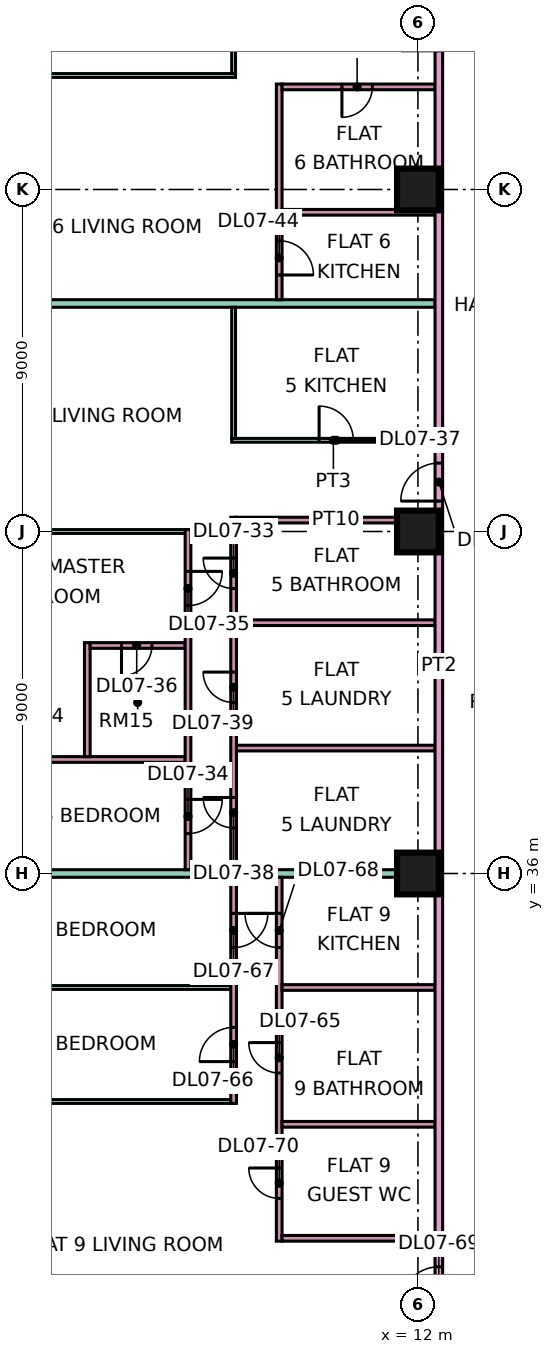
"""IFC4 building model, lengths in metres.
Left out: names, types, materials, properties, quantities, classifications, styles, units other than length and angle.
Written with IfcOpenShell. Run it as: python <this file> out.ifc"""

import sys

from ifc_helpers import new_model, si_unit, direction, frame, frame_2d, origin, origin_2d, place, context, subcontext, project, spatial, rectangle, extrude, element, fill, save


model = new_model("IFC4")
c1 = context("Model", 3, precision=1e-05, world=origin(), true_north=direction((0.0, 1.0)))
c2 = subcontext(c1, "Body", "Model", "MODEL_VIEW")
j1 = project(units=[si_unit("LENGTHUNIT", "METRE"), si_unit("PLANEANGLEUNIT", "RADIAN")], contexts=[c1])
p1 = place(None, origin())
s1 = spatial("IfcSite", under=j1, at=p1, CompositionType="ELEMENT")
p2 = place(p1, origin())
s2 = spatial("IfcBuilding", under=s1, at=p2, CompositionType="ELEMENT")
p3 = place(p2, frame((0.0, 0.0, 41.4)))
s3 = spatial("IfcBuildingStorey", under=s2, at=p3, CompositionType="ELEMENT", Elevation=41.4)
for number, where, z_axis, x_axis in (
    (1, (12.0, 36.0, 0.0), (0.0, 0.0, 1.0), (1.0, 0.0, 0.0)),
    (2, (12.0, 45.0, 0.0), (0.0, 0.0, 1.0), (1.0, 0.0, 0.0)),
    (3, (12.0, 54.0, 0.0), (0.0, 0.0, 1.0), (1.0, 0.0, 0.0)),
):
    element("IfcColumn", number, at=place(p3, frame(where, z_axis=z_axis, x_axis=x_axis)), inside=s3, PredefinedType="COLUMN", context=c2, shape_type="SweptSolid", body=[
        extrude(rectangle(XDim=1.1, YDim=1.1, at=origin_2d()), origin(), (0.0, 0.0, 1.0), 3.75),
    ])
p4 = place(p3, frame((-1.351, 33.0, 0.0), z_axis=(0.0, 0.0, 1.0), x_axis=(1.0, 0.0, 0.0)))
e4 = element("IfcWall", 4, at=p4, inside=s3, PredefinedType="PARTITIONING", context=c2, shape_type="SweptSolid", body=[
    extrude(rectangle(XDim=8.426, YDim=0.1, at=frame_2d((4.213, 0.0))), origin(), (0.0, 0.0, 1.0), 3.35),
])
p5 = place(p3, frame((-1.35, 30.0, 0.0), z_axis=(0.0, 0.0, 1.0), x_axis=(1.0, 0.0, 0.0)))
e5 = element("IfcWall", 5, at=p5, inside=s3, PredefinedType="PARTITIONING", context=c2, shape_type="SweptSolid", body=[
    extrude(rectangle(XDim=8.425, YDim=0.1, at=frame_2d((4.212, 0.0))), origin(), (0.0, 0.0, 1.0), 3.35),
])
p6 = place(p3, frame((0.0, 36.0, 0.0), z_axis=(0.0, 0.0, 1.0), x_axis=(1.0, 0.0, 0.0)))
e6 = element("IfcWall", 6, at=p6, inside=s3, PredefinedType="PARTITIONING", context=c2, shape_type="SweptSolid", body=[
    extrude(rectangle(XDim=12.45, YDim=0.2, at=frame_2d((6.225, 0.0))), origin(), (0.0, 0.0, 1.0), 3.35),
])
p7 = place(p3, frame((-1.35, 51.0, 0.0), z_axis=(0.0, 0.0, 1.0), x_axis=(1.0, 0.0, 0.0)))
e7 = element("IfcWall", 7, at=p7, inside=s3, PredefinedType="PARTITIONING", context=c2, shape_type="SweptSolid", body=[
    extrude(rectangle(XDim=13.8, YDim=0.2, at=frame_2d((6.9, 0.0))), origin(), (0.0, 0.0, 1.0), 3.35),
])
p8 = place(p3, frame((-1.35, 57.0, 0.0), z_axis=(0.0, 0.0, 1.0), x_axis=(1.0, 0.0, 0.0)))
e8 = element("IfcWall", 8, at=p8, inside=s3, PredefinedType="PARTITIONING", context=c2, shape_type="SweptSolid", body=[
    extrude(rectangle(XDim=8.55, YDim=0.1, at=frame_2d((4.275, 0.0))), origin(), (0.0, 0.0, 1.0), 3.35),
])
p9 = place(p3, frame((0.074, 39.0, 0.0), z_axis=(0.0, 0.0, 1.0), x_axis=(1.0, 0.0, 0.0)))
e9 = element("IfcWall", 9, at=p9, inside=s3, PredefinedType="PARTITIONING", context=c2, shape_type="SweptSolid", body=[
    extrude(rectangle(XDim=5.801, YDim=0.15, at=frame_2d((2.9, 0.0))), origin(), (0.0, 0.0, 1.0), 3.35),
])
p10 = place(p3, frame((0.074, 45.0, 0.0), z_axis=(0.0, 0.0, 1.0), x_axis=(1.0, 0.0, 0.0)))
e10 = element("IfcWall", 10, at=p10, inside=s3, PredefinedType="PARTITIONING", context=c2, shape_type="SweptSolid", body=[
    extrude(rectangle(XDim=5.801, YDim=0.1, at=frame_2d((2.9, 0.0))), origin(), (0.0, 0.0, 1.0), 3.35),
])
p11 = place(p3, frame((3.3, 39.075, 0.0), z_axis=(0.0, 0.0, 1.0), x_axis=(0.0, 1.0, 0.0)))
e11 = element("IfcWall", 11, at=p11, inside=s3, PredefinedType="PARTITIONING", context=c2, shape_type="SweptSolid", body=[
    extrude(rectangle(XDim=3.0, YDim=0.15, at=frame_2d((1.5, 0.0))), origin(), (0.0, 0.0, 1.0), 3.35),
])
p12 = place(p3, frame((3.375, 42.0, 0.0), z_axis=(0.0, 0.0, 1.0), x_axis=(1.0, 0.0, 0.0)))
e12 = element("IfcWall", 12, at=p12, inside=s3, PredefinedType="PARTITIONING", context=c2, shape_type="SweptSolid", body=[
    extrude(rectangle(XDim=2.5, YDim=0.15, at=frame_2d((1.25, 0.0))), origin(), (0.0, 0.0, 1.0), 3.35),
])
p13 = place(p12, frame((0.825, 0.0, 0.0)))
e13 = element("IfcOpeningElement", 13, at=p13, cuts=e12, PredefinedType="OPENING", context=c2, shape_type="SweptSolid", body=[
    extrude(rectangle(XDim=0.8, YDim=2.1, at=frame_2d((0.4, 1.05))), frame((0.0, 0.085, 0.0), z_axis=(0.0, -1.0, 0.0), x_axis=(1.0, 0.0, 0.0)), (0.0, 0.0, 1.0), 0.17),
])
p14 = place(p3, frame((5.95, 36.1, 0.0), z_axis=(0.0, 0.0, 1.0), x_axis=(0.0, 1.0, 0.0)))
e14 = element("IfcWall", 14, at=p14, inside=s3, PredefinedType="PARTITIONING", context=c2, shape_type="SweptSolid", body=[
    extrude(rectangle(XDim=8.95, YDim=0.15, at=frame_2d((4.475, 0.0))), origin(), (0.0, 0.0, 1.0), 3.35),
])
p15 = place(p14, frame((0.95, 0.0, 0.0)))
e15 = element("IfcOpeningElement", 15, at=p15, cuts=e14, PredefinedType="OPENING", context=c2, shape_type="SweptSolid", body=[
    extrude(rectangle(XDim=0.9, YDim=2.1, at=frame_2d((0.45, 1.05))), frame((0.0, 0.085, 0.0), z_axis=(0.0, -1.0, 0.0), x_axis=(1.0, 0.0, 0.0)), (0.0, 0.0, 1.0), 0.17),
])
p16 = place(p14, frame((6.95, 0.0, 0.0)))
e16 = element("IfcOpeningElement", 16, at=p16, cuts=e14, PredefinedType="OPENING", context=c2, shape_type="SweptSolid", body=[
    extrude(rectangle(XDim=0.9, YDim=2.1, at=frame_2d((0.45, 1.05))), frame((0.0, 0.085, 0.0), z_axis=(0.0, -1.0, 0.0), x_axis=(1.0, 0.0, 0.0)), (0.0, 0.0, 1.0), 0.17),
])
p17 = place(p3, frame((7.1, 47.4, 0.0), z_axis=(0.0, 0.0, 1.0), x_axis=(1.0, 0.0, 0.0)))
e17 = element("IfcWall", 17, at=p17, inside=s3, PredefinedType="PARTITIONING", context=c2, shape_type="SweptSolid", body=[
    extrude(rectangle(XDim=5.35, YDim=0.1, at=frame_2d((2.675, 0.0))), origin(), (0.0, 0.0, 1.0), 3.35),
])
p18 = place(p17, frame((2.3, 0.0, 0.0)))
e18 = element("IfcOpeningElement", 18, at=p18, cuts=e17, PredefinedType="OPENING", context=c2, shape_type="SweptSolid", body=[
    extrude(rectangle(XDim=0.9, YDim=2.1, at=frame_2d((0.45, 1.05))), frame((0.0, 0.06, 0.0), z_axis=(0.0, -1.0, 0.0), x_axis=(1.0, 0.0, 0.0)), (0.0, 0.0, 1.0), 0.12),
])
p19 = place(p3, frame((7.15, 29.95, 0.0), z_axis=(0.0, 0.0, 1.0), x_axis=(0.0, 1.0, 0.0)))
e19 = element("IfcWall", 19, at=p19, inside=s3, PredefinedType="PARTITIONING", context=c2, shape_type="SweptSolid", body=[
    extrude(rectangle(XDim=5.95, YDim=0.15, at=frame_2d((2.975, 0.0))), origin(), (0.0, 0.0, 1.0), 3.35),
])
p20 = place(p19, frame((1.1, 0.0, 0.0)))
e20 = element("IfcOpeningElement", 20, at=p20, cuts=e19, PredefinedType="OPENING", context=c2, shape_type="SweptSolid", body=[
    extrude(rectangle(XDim=0.9, YDim=2.1, at=frame_2d((0.45, 1.05))), frame((0.0, 0.085, 0.0), z_axis=(0.0, -1.0, 0.0), x_axis=(1.0, 0.0, 0.0)), (0.0, 0.0, 1.0), 0.17),
])
p21 = place(p19, frame((4.1, 0.0, 0.0)))
e21 = element("IfcOpeningElement", 21, at=p21, cuts=e19, PredefinedType="OPENING", context=c2, shape_type="SweptSolid", body=[
    extrude(rectangle(XDim=0.9, YDim=2.1, at=frame_2d((0.45, 1.05))), frame((0.0, 0.085, 0.0), z_axis=(0.0, -1.0, 0.0), x_axis=(1.0, 0.0, 0.0)), (0.0, 0.0, 1.0), 0.17),
])
p22 = place(p3, frame((7.15, 36.1, 0.0), z_axis=(0.0, 0.0, 1.0), x_axis=(0.0, 1.0, 0.0)))
e22 = element("IfcWall", 22, at=p22, inside=s3, PredefinedType="PARTITIONING", context=c2, shape_type="SweptSolid", body=[
    extrude(rectangle(XDim=9.275, YDim=0.15, at=frame_2d((4.637, 0.0))), origin(), (0.0, 0.0, 1.0), 3.35),
])
p23 = place(p22, frame((7.4, 0.0, 0.0)))
e23 = element("IfcOpeningElement", 23, at=p23, cuts=e22, PredefinedType="OPENING", context=c2, shape_type="SweptSolid", body=[
    extrude(rectangle(XDim=0.8, YDim=2.1, at=frame_2d((0.4, 1.05))), frame((0.0, 0.085, 0.0), z_axis=(0.0, -1.0, 0.0), x_axis=(1.0, 0.0, 0.0)), (0.0, 0.0, 1.0), 0.17),
])
p24 = place(p22, frame((1.1, 0.0, 0.0)))
e24 = element("IfcOpeningElement", 24, at=p24, cuts=e22, PredefinedType="OPENING", context=c2, shape_type="SweptSolid", body=[
    extrude(rectangle(XDim=0.8, YDim=2.1, at=frame_2d((0.4, 1.05))), frame((0.0, 0.085, 0.0), z_axis=(0.0, -1.0, 0.0), x_axis=(1.0, 0.0, 0.0)), (0.0, 0.0, 1.0), 0.17),
])
p25 = place(p22, frame((4.4, 0.0, 0.0)))
e25 = element("IfcOpeningElement", 25, at=p25, cuts=e22, PredefinedType="OPENING", context=c2, shape_type="SweptSolid", body=[
    extrude(rectangle(XDim=0.8, YDim=2.1, at=frame_2d((0.4, 1.05))), frame((0.0, 0.085, 0.0), z_axis=(0.0, -1.0, 0.0), x_axis=(1.0, 0.0, 0.0)), (0.0, 0.0, 1.0), 0.17),
])
p26 = place(p3, frame((7.15, 47.45, 0.0), z_axis=(0.0, 0.0, 1.0), x_axis=(0.0, 1.0, 0.0)))
e26 = element("IfcWall", 26, at=p26, inside=s3, PredefinedType="PARTITIONING", context=c2, shape_type="SweptSolid", body=[
    extrude(rectangle(XDim=3.45, YDim=0.1, at=frame_2d((1.725, 0.0))), origin(), (0.0, 0.0, 1.0), 3.35),
])
p27 = place(p3, frame((7.15, 57.05, 0.0), z_axis=(0.0, 0.0, 1.0), x_axis=(0.0, 1.0, 0.0)))
e27 = element("IfcWall", 27, at=p27, inside=s3, PredefinedType="PARTITIONING", context=c2, shape_type="SweptSolid", body=[
    extrude(rectangle(XDim=7.3, YDim=0.1, at=frame_2d((3.65, 0.0))), origin(), (0.0, 0.0, 1.0), 3.35),
])
p28 = place(p27, frame((1.0, 0.0, 0.0)))
e28 = element("IfcOpeningElement", 28, at=p28, cuts=e27, PredefinedType="OPENING", context=c2, shape_type="SweptSolid", body=[
    extrude(rectangle(XDim=0.9, YDim=2.1, at=frame_2d((0.45, 1.05))), frame((0.0, 0.06, 0.0), z_axis=(0.0, -1.0, 0.0), x_axis=(1.0, 0.0, 0.0)), (0.0, 0.0, 1.0), 0.12),
])
p29 = place(p27, frame((4.0, 0.0, 0.0)))
e29 = element("IfcOpeningElement", 29, at=p29, cuts=e27, PredefinedType="OPENING", context=c2, shape_type="SweptSolid", body=[
    extrude(rectangle(XDim=0.9, YDim=2.1, at=frame_2d((0.45, 1.05))), frame((0.0, 0.06, 0.0), z_axis=(0.0, -1.0, 0.0), x_axis=(1.0, 0.0, 0.0)), (0.0, 0.0, 1.0), 0.12),
])
for number, where, z_axis, x_axis in (
    (30, (7.225, 39.3, 0.0), (0.0, 0.0, 1.0), (1.0, 0.0, 0.0)),
    (31, (7.225, 42.6, 0.0), (0.0, 0.0, 1.0), (1.0, 0.0, 0.0)),
    (32, (7.225, 45.3, 0.0), (0.0, 0.0, 1.0), (1.0, 0.0, 0.0)),
):
    element("IfcWall", number, at=place(p3, frame(where, z_axis=z_axis, x_axis=x_axis)), inside=s3, PredefinedType="PARTITIONING", context=c2, shape_type="SweptSolid", body=[
        extrude(rectangle(XDim=5.225, YDim=0.15, at=frame_2d((2.612, 0.0))), origin(), (0.0, 0.0, 1.0), 3.35),
    ])
p30 = place(p3, frame((8.35, 26.325, 0.0), z_axis=(0.0, 0.0, 1.0), x_axis=(0.0, 1.0, 0.0)))
e33 = element("IfcWall", 33, at=p30, inside=s3, PredefinedType="PARTITIONING", context=c2, shape_type="SweptSolid", body=[
    extrude(rectangle(XDim=9.575, YDim=0.15, at=frame_2d((4.788, 0.0))), origin(), (0.0, 0.0, 1.0), 3.35),
])
p31 = place(p30, frame((4.425, 0.0, 0.0)))
e34 = element("IfcOpeningElement", 34, at=p31, cuts=e33, PredefinedType="OPENING", context=c2, shape_type="SweptSolid", body=[
    extrude(rectangle(XDim=0.8, YDim=2.1, at=frame_2d((0.4, 1.05))), frame((0.0, 0.085, 0.0), z_axis=(0.0, -1.0, 0.0), x_axis=(1.0, 0.0, 0.0)), (0.0, 0.0, 1.0), 0.17),
])
p32 = place(p30, frame((7.725, 0.0, 0.0)))
e35 = element("IfcOpeningElement", 35, at=p32, cuts=e33, PredefinedType="OPENING", context=c2, shape_type="SweptSolid", body=[
    extrude(rectangle(XDim=0.9, YDim=2.1, at=frame_2d((0.45, 1.05))), frame((0.0, 0.085, 0.0), z_axis=(0.0, -1.0, 0.0), x_axis=(1.0, 0.0, 0.0)), (0.0, 0.0, 1.0), 0.17),
])
p33 = place(p30, frame((1.125, 0.0, 0.0)))
e36 = element("IfcOpeningElement", 36, at=p33, cuts=e33, PredefinedType="OPENING", context=c2, shape_type="SweptSolid", body=[
    extrude(rectangle(XDim=0.8, YDim=2.1, at=frame_2d((0.4, 1.05))), frame((0.0, 0.085, 0.0), z_axis=(0.0, -1.0, 0.0), x_axis=(1.0, 0.0, 0.0)), (0.0, 0.0, 1.0), 0.17),
])
p34 = place(p3, frame((8.35, 51.1, 0.0), z_axis=(0.0, 0.0, 1.0), x_axis=(0.0, 1.0, 0.0)))
e37 = element("IfcWall", 37, at=p34, inside=s3, PredefinedType="PARTITIONING", context=c2, shape_type="SweptSolid", body=[
    extrude(rectangle(XDim=5.675, YDim=0.15, at=frame_2d((2.837, 0.0))), origin(), (0.0, 0.0, 1.0), 3.35),
])
p35 = place(p34, frame((0.65, 0.0, 0.0)))
e38 = element("IfcOpeningElement", 38, at=p35, cuts=e37, PredefinedType="OPENING", context=c2, shape_type="SweptSolid", body=[
    extrude(rectangle(XDim=0.9, YDim=2.1, at=frame_2d((0.45, 1.05))), frame((0.0, 0.085, 0.0), z_axis=(0.0, -1.0, 0.0), x_axis=(1.0, 0.0, 0.0)), (0.0, 0.0, 1.0), 0.17),
])
for number, where, z_axis, x_axis in (
    (39, (8.425, 26.4, 0.0), (0.0, 0.0, 1.0), (1.0, 0.0, 0.0)),
    (40, (8.425, 29.4, 0.0), (0.0, 0.0, 1.0), (1.0, 0.0, 0.0)),
    (41, (8.425, 33.0, 0.0), (0.0, 0.0, 1.0), (1.0, 0.0, 0.0)),
    (42, (8.425, 53.4, 0.0), (0.0, 0.0, 1.0), (1.0, 0.0, 0.0)),
):
    element("IfcWall", number, at=place(p3, frame(where, z_axis=z_axis, x_axis=x_axis)), inside=s3, PredefinedType="PARTITIONING", context=c2, shape_type="SweptSolid", body=[
        extrude(rectangle(XDim=4.025, YDim=0.15, at=frame_2d((2.012, 0.0))), origin(), (0.0, 0.0, 1.0), 3.35),
    ])
p36 = place(p3, frame((8.425, 56.7, 0.0), z_axis=(0.0, 0.0, 1.0), x_axis=(1.0, 0.0, 0.0)))
e43 = element("IfcWall", 43, at=p36, inside=s3, PredefinedType="PARTITIONING", context=c2, shape_type="SweptSolid", body=[
    extrude(rectangle(XDim=4.025, YDim=0.15, at=frame_2d((2.012, 0.0))), origin(), (0.0, 0.0, 1.0), 3.35),
])
p37 = place(p36, frame((1.575, 0.0, 0.0)))
e44 = element("IfcOpeningElement", 44, at=p37, cuts=e43, PredefinedType="OPENING", context=c2, shape_type="SweptSolid", body=[
    extrude(rectangle(XDim=0.8, YDim=2.1, at=frame_2d((0.4, 1.05))), frame((0.0, 0.085, 0.0), z_axis=(0.0, -1.0, 0.0), x_axis=(1.0, 0.0, 0.0)), (0.0, 0.0, 1.0), 0.17),
])
p38 = place(p3, frame((12.55, 20.0, 0.0), z_axis=(0.0, 0.0, 1.0), x_axis=(0.0, 1.0, 0.0)))
e45 = element("IfcWall", 45, at=p38, inside=s3, PredefinedType="PARTITIONING", context=c2, shape_type="SweptSolid", body=[
    extrude(rectangle(XDim=42.926, YDim=0.2, at=frame_2d((21.463, 0.0))), origin(), (0.0, 0.0, 1.0), 3.35),
])
p39 = place(p38, frame((25.8, 0.0, 0.0)))
e46 = element("IfcOpeningElement", 46, at=p39, cuts=e45, PredefinedType="OPENING", context=c2, shape_type="SweptSolid", body=[
    extrude(rectangle(XDim=1.0, YDim=2.1, at=frame_2d((0.5, 1.05))), frame((0.0, 0.11, 0.0), z_axis=(0.0, -1.0, 0.0), x_axis=(1.0, 0.0, 0.0)), (0.0, 0.0, 1.0), 0.22),
])
p40 = place(p38, frame((37.65, 0.0, 0.0)))
e47 = element("IfcOpeningElement", 47, at=p40, cuts=e45, PredefinedType="OPENING", context=c2, shape_type="SweptSolid", body=[
    extrude(rectangle(XDim=1.0, YDim=2.1, at=frame_2d((0.5, 1.05))), frame((0.0, 0.11, 0.0), z_axis=(0.0, -1.0, 0.0), x_axis=(1.0, 0.0, 0.0)), (0.0, 0.0, 1.0), 0.22),
])
p41 = place(p38, frame((0.6, 0.0, 0.0)))
e48 = element("IfcOpeningElement", 48, at=p41, cuts=e45, PredefinedType="OPENING", context=c2, shape_type="SweptSolid", body=[
    extrude(rectangle(XDim=1.2, YDim=2.1, at=frame_2d((0.6, 1.05))), frame((0.0, 0.11, 0.0), z_axis=(0.0, -1.0, 0.0), x_axis=(1.0, 0.0, 0.0)), (0.0, 0.0, 1.0), 0.22),
])
p42 = place(p38, frame((4.65, 0.0, 0.0)))
e49 = element("IfcOpeningElement", 49, at=p42, cuts=e45, PredefinedType="OPENING", context=c2, shape_type="SweptSolid", body=[
    extrude(rectangle(XDim=1.0, YDim=2.1, at=frame_2d((0.5, 1.05))), frame((0.0, 0.11, 0.0), z_axis=(0.0, -1.0, 0.0), x_axis=(1.0, 0.0, 0.0)), (0.0, 0.0, 1.0), 0.22),
])
p43 = place(p23, frame((0.8, 0.0, 0.0), z_axis=(0.0, 0.0, 1.0), x_axis=(-1.0, 0.0, 0.0)))
e50 = element("IfcDoor", 50, at=p43, inside=s3, OperationType="SINGLE_SWING_RIGHT", PredefinedType="DOOR", context=c2, shape_type="SweptSolid", body=[
    extrude(rectangle(XDim=0.8, YDim=2.1, at=frame_2d((0.4, 1.05))), frame((0.0, 0.025, 0.0), z_axis=(0.0, -1.0, 0.0), x_axis=(1.0, 0.0, 0.0)), (0.0, 0.0, 1.0), 0.05),
])
fill(e23, e50)
p44 = place(p15, origin())
e51 = element("IfcDoor", 51, at=p44, inside=s3, OperationType="SINGLE_SWING_RIGHT", PredefinedType="DOOR", context=c2, shape_type="SweptSolid", body=[
    extrude(rectangle(XDim=0.9, YDim=2.1, at=frame_2d((0.45, 1.05))), frame((0.0, 0.025, 0.0), z_axis=(0.0, -1.0, 0.0), x_axis=(1.0, 0.0, 0.0)), (0.0, 0.0, 1.0), 0.05),
])
fill(e15, e51)
p45 = place(p16, origin())
e52 = element("IfcDoor", 52, at=p45, inside=s3, OperationType="SINGLE_SWING_RIGHT", PredefinedType="DOOR", context=c2, shape_type="SweptSolid", body=[
    extrude(rectangle(XDim=0.9, YDim=2.1, at=frame_2d((0.45, 1.05))), frame((0.0, 0.025, 0.0), z_axis=(0.0, -1.0, 0.0), x_axis=(1.0, 0.0, 0.0)), (0.0, 0.0, 1.0), 0.05),
])
fill(e16, e52)
p46 = place(p13, frame((0.8, 0.0, 0.0), z_axis=(0.0, 0.0, 1.0), x_axis=(-1.0, 0.0, 0.0)))
e53 = element("IfcDoor", 53, at=p46, inside=s3, OperationType="SINGLE_SWING_LEFT", PredefinedType="DOOR", context=c2, shape_type="SweptSolid", body=[
    extrude(rectangle(XDim=0.8, YDim=2.1, at=frame_2d((0.4, 1.05))), frame((0.0, 0.025, 0.0), z_axis=(0.0, -1.0, 0.0), x_axis=(1.0, 0.0, 0.0)), (0.0, 0.0, 1.0), 0.05),
])
fill(e13, e53)
p47 = place(p18, origin())
e54 = element("IfcDoor", 54, at=p47, inside=s3, OperationType="SINGLE_SWING_LEFT", PredefinedType="DOOR", context=c2, shape_type="SweptSolid", body=[
    extrude(rectangle(XDim=0.9, YDim=2.1, at=frame_2d((0.45, 1.05))), frame((0.0, 0.025, 0.0), z_axis=(0.0, -1.0, 0.0), x_axis=(1.0, 0.0, 0.0)), (0.0, 0.0, 1.0), 0.05),
])
fill(e18, e54)
p48 = place(p24, frame((0.8, 0.0, 0.0), z_axis=(0.0, 0.0, 1.0), x_axis=(-1.0, 0.0, 0.0)))
e55 = element("IfcDoor", 55, at=p48, inside=s3, OperationType="SINGLE_SWING_RIGHT", PredefinedType="DOOR", context=c2, shape_type="SweptSolid", body=[
    extrude(rectangle(XDim=0.8, YDim=2.1, at=frame_2d((0.4, 1.05))), frame((0.0, 0.025, 0.0), z_axis=(0.0, -1.0, 0.0), x_axis=(1.0, 0.0, 0.0)), (0.0, 0.0, 1.0), 0.05),
])
fill(e24, e55)
p49 = place(p25, frame((0.8, 0.0, 0.0), z_axis=(0.0, 0.0, 1.0), x_axis=(-1.0, 0.0, 0.0)))
e56 = element("IfcDoor", 56, at=p49, inside=s3, OperationType="SINGLE_SWING_RIGHT", PredefinedType="DOOR", context=c2, shape_type="SweptSolid", body=[
    extrude(rectangle(XDim=0.8, YDim=2.1, at=frame_2d((0.4, 1.05))), frame((0.0, 0.025, 0.0), z_axis=(0.0, -1.0, 0.0), x_axis=(1.0, 0.0, 0.0)), (0.0, 0.0, 1.0), 0.05),
])
fill(e25, e56)
p50 = place(p39, origin())
e57 = element("IfcDoor", 57, at=p50, inside=s3, OperationType="SINGLE_SWING_LEFT", PredefinedType="DOOR", context=c2, shape_type="SweptSolid", body=[
    extrude(rectangle(XDim=1.0, YDim=2.1, at=frame_2d((0.5, 1.05))), frame((0.0, 0.025, 0.0), z_axis=(0.0, -1.0, 0.0), x_axis=(1.0, 0.0, 0.0)), (0.0, 0.0, 1.0), 0.05),
])
fill(e46, e57)
p51 = place(p37, frame((0.8, 0.0, 0.0), z_axis=(0.0, 0.0, 1.0), x_axis=(-1.0, 0.0, 0.0)))
e58 = element("IfcDoor", 58, at=p51, inside=s3, OperationType="SINGLE_SWING_LEFT", PredefinedType="DOOR", context=c2, shape_type="SweptSolid", body=[
    extrude(rectangle(XDim=0.8, YDim=2.1, at=frame_2d((0.4, 1.05))), frame((0.0, 0.025, 0.0), z_axis=(0.0, -1.0, 0.0), x_axis=(1.0, 0.0, 0.0)), (0.0, 0.0, 1.0), 0.05),
])
fill(e44, e58)
p52 = place(p35, frame((0.9, 0.0, 0.0), z_axis=(0.0, 0.0, 1.0), x_axis=(-1.0, 0.0, 0.0)))
e59 = element("IfcDoor", 59, at=p52, inside=s3, OperationType="SINGLE_SWING_LEFT", PredefinedType="DOOR", context=c2, shape_type="SweptSolid", body=[
    extrude(rectangle(XDim=0.9, YDim=2.1, at=frame_2d((0.45, 1.05))), frame((0.0, 0.025, 0.0), z_axis=(0.0, -1.0, 0.0), x_axis=(1.0, 0.0, 0.0)), (0.0, 0.0, 1.0), 0.05),
])
fill(e38, e59)
p53 = place(p31, frame((0.8, 0.0, 0.0), z_axis=(0.0, 0.0, 1.0), x_axis=(-1.0, 0.0, 0.0)))
e60 = element("IfcDoor", 60, at=p53, inside=s3, OperationType="SINGLE_SWING_RIGHT", PredefinedType="DOOR", context=c2, shape_type="SweptSolid", body=[
    extrude(rectangle(XDim=0.8, YDim=2.1, at=frame_2d((0.4, 1.05))), frame((0.0, 0.025, 0.0), z_axis=(0.0, -1.0, 0.0), x_axis=(1.0, 0.0, 0.0)), (0.0, 0.0, 1.0), 0.05),
])
fill(e34, e60)
p54 = place(p20, origin())
e61 = element("IfcDoor", 61, at=p54, inside=s3, OperationType="SINGLE_SWING_LEFT", PredefinedType="DOOR", context=c2, shape_type="SweptSolid", body=[
    extrude(rectangle(XDim=0.9, YDim=2.1, at=frame_2d((0.45, 1.05))), frame((0.0, 0.025, 0.0), z_axis=(0.0, -1.0, 0.0), x_axis=(1.0, 0.0, 0.0)), (0.0, 0.0, 1.0), 0.05),
])
fill(e20, e61)
p55 = place(p21, origin())
e62 = element("IfcDoor", 62, at=p55, inside=s3, OperationType="SINGLE_SWING_RIGHT", PredefinedType="DOOR", context=c2, shape_type="SweptSolid", body=[
    extrude(rectangle(XDim=0.9, YDim=2.1, at=frame_2d((0.45, 1.05))), frame((0.0, 0.025, 0.0), z_axis=(0.0, -1.0, 0.0), x_axis=(1.0, 0.0, 0.0)), (0.0, 0.0, 1.0), 0.05),
])
fill(e21, e62)
p56 = place(p32, frame((0.9, 0.0, 0.0), z_axis=(0.0, 0.0, 1.0), x_axis=(-1.0, 0.0, 0.0)))
e63 = element("IfcDoor", 63, at=p56, inside=s3, OperationType="SINGLE_SWING_RIGHT", PredefinedType="DOOR", context=c2, shape_type="SweptSolid", body=[
    extrude(rectangle(XDim=0.9, YDim=2.1, at=frame_2d((0.45, 1.05))), frame((0.0, 0.025, 0.0), z_axis=(0.0, -1.0, 0.0), x_axis=(1.0, 0.0, 0.0)), (0.0, 0.0, 1.0), 0.05),
])
fill(e35, e63)
p57 = place(p42, origin())
e64 = element("IfcDoor", 64, at=p57, inside=s3, OperationType="SINGLE_SWING_LEFT", PredefinedType="DOOR", context=c2, shape_type="SweptSolid", body=[
    extrude(rectangle(XDim=1.0, YDim=2.1, at=frame_2d((0.5, 1.05))), frame((0.0, 0.025, 0.0), z_axis=(0.0, -1.0, 0.0), x_axis=(1.0, 0.0, 0.0)), (0.0, 0.0, 1.0), 0.05),
])
fill(e49, e64)
p58 = place(p33, frame((0.8, 0.0, 0.0), z_axis=(0.0, 0.0, 1.0), x_axis=(-1.0, 0.0, 0.0)))
e65 = element("IfcDoor", 65, at=p58, inside=s3, OperationType="SINGLE_SWING_RIGHT", PredefinedType="DOOR", context=c2, shape_type="SweptSolid", body=[
    extrude(rectangle(XDim=0.8, YDim=2.1, at=frame_2d((0.4, 1.05))), frame((0.0, 0.025, 0.0), z_axis=(0.0, -1.0, 0.0), x_axis=(1.0, 0.0, 0.0)), (0.0, 0.0, 1.0), 0.05),
])
fill(e36, e65)
save(model, sys.argv[1])
